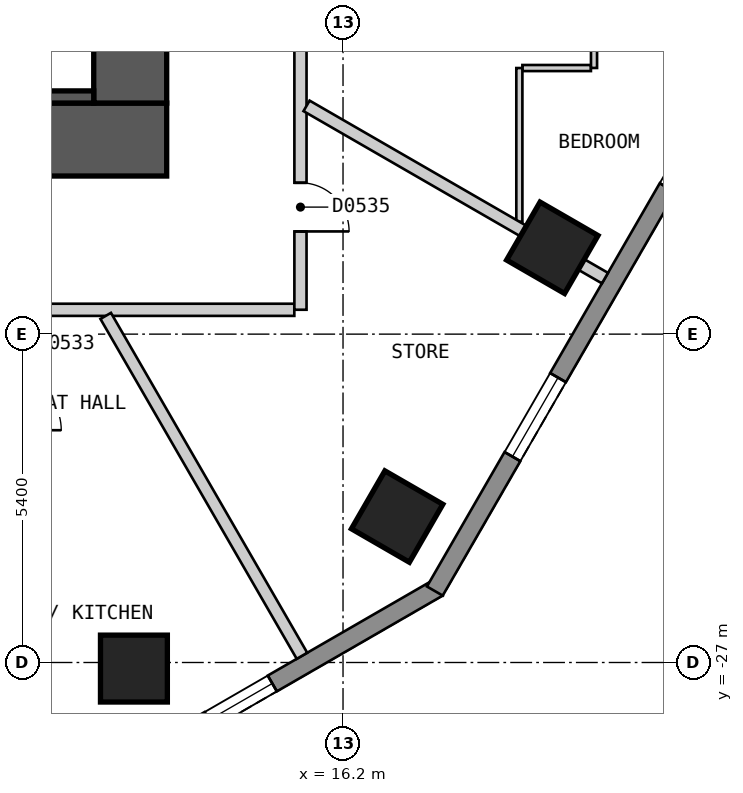
"""IFC4 building model, lengths in metres.
Left out: names, types, materials, properties, quantities, classifications, styles, units other than length and angle.
Written with IfcOpenShell. Run it as: python <this file> out.ifc"""

import sys

from ifc_helpers import new_model, si_unit, direction, frame, frame_2d, origin, origin_2d, place, context, subcontext, project, spatial, polyline, rectangle, outline, extrude, element, fill, save


model = new_model("IFC4")
c1 = context("Model", 3, precision=1e-05, world=origin(), true_north=direction((0.0, 1.0)))
c2 = subcontext(c1, "Body", "Model", "MODEL_VIEW")
j1 = project(units=[si_unit("LENGTHUNIT", "METRE"), si_unit("PLANEANGLEUNIT", "RADIAN")], contexts=[c1])
p1 = place(None, origin())
s1 = spatial("IfcSite", under=j1, at=p1, CompositionType="ELEMENT")
p2 = place(p1, origin())
s2 = spatial("IfcBuilding", under=s1, at=p2, CompositionType="ELEMENT")
p3 = place(p2, frame((0.0, 0.0, 50.4)))
s3 = spatial("IfcBuildingStorey", under=s2, at=p3, CompositionType="ELEMENT", Elevation=50.4)
for number, where, z_axis, x_axis in (
    (1, (12.761, -27.1, 0.0), (0.0, 0.0, 1.0), (1.0, 0.0, 0.0)),
    (2, (17.09, -24.6, 0.0), (0.0, 0.0, 1.0), (0.5, 0.866, 0.0)),
    (3, (19.642, -20.18, 0.0), (0.0, 0.0, 1.0), (0.5, 0.866, 0.0)),
):
    element("IfcColumn", number, at=place(p3, frame(where, z_axis=z_axis, x_axis=x_axis)), inside=s3, PredefinedType="COLUMN", context=c2, shape_type="SweptSolid", body=[
        extrude(rectangle(XDim=1.1, YDim=1.1, at=origin_2d()), origin(), (0.0, 0.0, 1.0), 3.0),
    ])
p4 = place(p3, frame((-13.3, -18.4, 0.0), z_axis=(0.0, 0.0, 1.0), x_axis=(1.0, 0.0, 0.0)))
e4 = element("IfcWall", 4, at=p4, inside=s3, PredefinedType="SHEAR", context=c2, shape_type="SweptSolid", body=[
    extrude(rectangle(XDim=26.6, YDim=1.2, at=frame_2d((13.3, 0.0))), origin(), (0.0, 0.0, 1.0), 2.7),
])
p5 = place(p3, frame((12.7, -17.8, 0.0), z_axis=(0.0, 0.0, 1.0), x_axis=(0.0, 1.0, 0.0)))
e5 = element("IfcWall", 5, at=p5, inside=s3, PredefinedType="SHEAR", context=c2, shape_type="SweptSolid", body=[
    extrude(rectangle(XDim=11.6, YDim=1.2, at=frame_2d((5.8, 0.0))), origin(), (0.0, 0.0, 1.0), 2.7),
])
p6 = place(p3, frame((13.435, -28.27, 0.0), z_axis=(0.0, 0.0, 1.0), x_axis=(0.866010750942, 0.50002537861, 0.0)))
e6 = element("IfcWall", 6, at=p6, inside=s3, PredefinedType="SOLIDWALL", context=c2, shape_type="SweptSolid", body=[
    extrude(outline(polyline([(0.0, -0.15), (5.0, -0.15), (4.919, 0.15), (0.08, 0.15), (0.0, -0.15)])), origin(), (0.0, 0.0, 1.0), 2.7),
])
p7 = place(p6, frame((0.65, 0.0, 0.15)))
e7 = element("IfcOpeningElement", 7, at=p7, cuts=e6, PredefinedType="OPENING", context=c2, shape_type="SweptSolid", body=[
    extrude(rectangle(XDim=1.2, YDim=2.1, at=frame_2d((0.6, 1.05))), frame((0.0, 0.16, 0.0), z_axis=(0.0, -1.0, 0.0), x_axis=(1.0, 0.0, 0.0)), (0.0, 0.0, 1.0), 0.32),
])
p8 = place(p3, frame((17.71, -25.825, 0.0), z_axis=(0.0, 0.0, 1.0), x_axis=(0.500001938803, 0.866024284413, 0.0)))
e8 = element("IfcWall", 8, at=p8, inside=s3, PredefinedType="SOLIDWALL", context=c2, shape_type="SweptSolid", body=[
    extrude(outline(polyline([(0.0, -0.15), (27.02, -0.15), (26.94, 0.15), (0.08, 0.15), (0.0, -0.15)])), origin(), (0.0, 0.0, 1.0), 2.7),
])
p9 = place(p8, frame((2.553, 0.0, 0.15)))
e9 = element("IfcOpeningElement", 9, at=p9, cuts=e8, PredefinedType="OPENING", context=c2, shape_type="SweptSolid", body=[
    extrude(rectangle(XDim=1.5, YDim=2.1, at=frame_2d((0.75, 1.05))), frame((0.0, 0.16, 0.0), z_axis=(0.0, -1.0, 0.0), x_axis=(1.0, 0.0, 0.0)), (0.0, 0.0, 1.0), 0.32),
])
p10 = place(p8, frame((7.658, 0.0, 0.15)))
e10 = element("IfcOpeningElement", 10, at=p10, cuts=e8, PredefinedType="OPENING", context=c2, shape_type="SweptSolid", body=[
    extrude(rectangle(XDim=1.5, YDim=2.1, at=frame_2d((0.75, 1.05))), frame((0.0, 0.16, 0.0), z_axis=(0.0, -1.0, 0.0), x_axis=(1.0, 0.0, 0.0)), (0.0, 0.0, 1.0), 0.32),
])
p11 = place(p8, frame((12.761, 0.0, 0.15)))
e11 = element("IfcOpeningElement", 11, at=p11, cuts=e8, PredefinedType="OPENING", context=c2, shape_type="SweptSolid", body=[
    extrude(rectangle(XDim=1.5, YDim=2.1, at=frame_2d((0.75, 1.05))), frame((0.0, 0.16, 0.0), z_axis=(0.0, -1.0, 0.0), x_axis=(1.0, 0.0, 0.0)), (0.0, 0.0, 1.0), 0.32),
])
p12 = place(p8, frame((17.865, 0.0, 0.15)))
e12 = element("IfcOpeningElement", 12, at=p12, cuts=e8, PredefinedType="OPENING", context=c2, shape_type="SweptSolid", body=[
    extrude(rectangle(XDim=1.5, YDim=2.1, at=frame_2d((0.75, 1.05))), frame((0.0, 0.16, 0.0), z_axis=(0.0, -1.0, 0.0), x_axis=(1.0, 0.0, 0.0)), (0.0, 0.0, 1.0), 0.32),
])
p13 = place(p8, frame((22.969, 0.0, 0.15)))
e13 = element("IfcOpeningElement", 13, at=p13, cuts=e8, PredefinedType="OPENING", context=c2, shape_type="SweptSolid", body=[
    extrude(rectangle(XDim=1.5, YDim=2.1, at=frame_2d((0.75, 1.05))), frame((0.0, 0.16, 0.0), z_axis=(0.0, -1.0, 0.0), x_axis=(1.0, 0.0, 0.0)), (0.0, 0.0, 1.0), 0.32),
])
p14 = place(p3, frame((-15.4, -21.2, 0.0), z_axis=(0.0, 0.0, 1.0), x_axis=(1.0, 0.0, 0.0)))
e14 = element("IfcWall", 14, at=p14, inside=s3, PredefinedType="PARTITIONING", context=c2, shape_type="SweptSolid", body=[
    extrude(rectangle(XDim=30.799, YDim=0.2, at=frame_2d((15.399, 0.0))), origin(), (0.0, 0.0, 1.0), 2.7),
])
p15 = place(p14, frame((4.985, 0.0, 0.0)))
e15 = element("IfcOpeningElement", 15, at=p15, cuts=e14, PredefinedType="OPENING", context=c2, shape_type="SweptSolid", body=[
    extrude(rectangle(XDim=0.9, YDim=2.1, at=frame_2d((0.45, 1.05))), frame((0.0, 0.11, 0.0), z_axis=(0.0, -1.0, 0.0), x_axis=(1.0, 0.0, 0.0)), (0.0, 0.0, 1.0), 0.22),
])
p16 = place(p14, frame((20.005, 0.0, 0.0)))
e16 = element("IfcOpeningElement", 16, at=p16, cuts=e14, PredefinedType="OPENING", context=c2, shape_type="SweptSolid", body=[
    extrude(rectangle(XDim=1.0, YDim=2.1, at=frame_2d((0.5, 1.05))), frame((0.0, 0.11, 0.0), z_axis=(0.0, -1.0, 0.0), x_axis=(1.0, 0.0, 0.0)), (0.0, 0.0, 1.0), 0.22),
])
p17 = place(p14, frame((24.916, 0.0, 0.0)))
e17 = element("IfcOpeningElement", 17, at=p17, cuts=e14, PredefinedType="OPENING", context=c2, shape_type="SweptSolid", body=[
    extrude(rectangle(XDim=0.9, YDim=2.1, at=frame_2d((0.45, 1.05))), frame((0.0, 0.11, 0.0), z_axis=(0.0, -1.0, 0.0), x_axis=(1.0, 0.0, 0.0)), (0.0, 0.0, 1.0), 0.22),
])
p18 = place(p3, frame((15.5, -21.199, 0.0), z_axis=(0.0, 0.0, 1.0), x_axis=(0.0, 1.0, 0.0)))
e18 = element("IfcWall", 18, at=p18, inside=s3, PredefinedType="PARTITIONING", context=c2, shape_type="SweptSolid", body=[
    extrude(rectangle(XDim=7.575, YDim=0.2, at=frame_2d((3.788, 0.0))), origin(), (0.0, 0.0, 1.0), 2.7),
])
p19 = place(p18, frame((1.288, 0.0, 0.0)))
e19 = element("IfcOpeningElement", 19, at=p19, cuts=e18, PredefinedType="OPENING", context=c2, shape_type="SweptSolid", body=[
    extrude(rectangle(XDim=0.8, YDim=2.1, at=frame_2d((0.4, 1.05))), frame((0.0, 0.11, 0.0), z_axis=(0.0, -1.0, 0.0), x_axis=(1.0, 0.0, 0.0)), (0.0, 0.0, 1.0), 0.22),
])
p20 = place(p3, frame((19.15, -17.224, 0.0), z_axis=(0.0, 0.0, 1.0), x_axis=(1.0, 0.0, 0.0)))
e20 = element("IfcWall", 20, at=p20, inside=s3, PredefinedType="PARTITIONING", context=c2, shape_type="SweptSolid", body=[
    extrude(rectangle(XDim=1.127, YDim=0.1, at=frame_2d((0.563, 0.0))), origin(), (0.0, 0.0, 1.0), 2.7),
])
p21 = place(p3, frame((19.1, -19.751, 0.0), z_axis=(0.0, 0.0, 1.0), x_axis=(0.0, 1.0, 0.0)))
e21 = element("IfcWall", 21, at=p21, inside=s3, PredefinedType="PARTITIONING", context=c2, shape_type="SweptSolid", body=[
    extrude(rectangle(XDim=2.527, YDim=0.1, at=frame_2d((1.263, 0.0))), origin(), (0.0, 0.0, 1.0), 2.7),
])
p22 = place(p3, frame((20.328, -17.223, 0.0), z_axis=(0.0, 0.0, 1.0), x_axis=(0.0, 1.0, 0.0)))
e22 = element("IfcWall", 22, at=p22, inside=s3, PredefinedType="PARTITIONING", context=c2, shape_type="SweptSolid", body=[
    extrude(rectangle(XDim=8.376, YDim=0.1, at=frame_2d((4.188, 0.0))), origin(), (0.0, 0.0, 1.0), 2.7),
])
p23 = place(p22, frame((0.37, 0.0, 0.0)))
e23 = element("IfcOpeningElement", 23, at=p23, cuts=e22, PredefinedType="OPENING", context=c2, shape_type="SweptSolid", body=[
    extrude(rectangle(XDim=0.8, YDim=2.1, at=frame_2d((0.4, 1.05))), frame((0.0, 0.06, 0.0), z_axis=(0.0, -1.0, 0.0), x_axis=(1.0, 0.0, 0.0)), (0.0, 0.0, 1.0), 0.12),
])
p24 = place(p3, frame((12.297, -21.3, 0.0), z_axis=(0.0, 0.0, 1.0), x_axis=(0.500056399578, -0.865992839024, 0.0)))
e24 = element("IfcWall", 24, at=p24, inside=s3, PredefinedType="PARTITIONING", context=c2, shape_type="SweptSolid", body=[
    extrude(rectangle(XDim=6.455, YDim=0.2, at=frame_2d((3.228, 0.0))), origin(), (0.0, 0.0, 1.0), 2.7),
])
p25 = place(p3, frame((15.6, -17.846, 0.0), z_axis=(0.0, 0.0, 1.0), x_axis=(0.866071523686, -0.499920109479, 0.0)))
e25 = element("IfcWall", 25, at=p25, inside=s3, PredefinedType="PARTITIONING", context=c2, shape_type="SweptSolid", body=[
    extrude(rectangle(XDim=5.667, YDim=0.2, at=frame_2d((2.833, 0.0))), origin(), (0.0, 0.0, 1.0), 2.7),
])
p26 = place(p3, frame((6.7, -17.7, 0.0), z_axis=(0.0, 0.0, 1.0), x_axis=(1.0, 0.0, 0.0)))
e26 = element("IfcWall", 26, at=p26, inside=s3, PredefinedType="SOLIDWALL", context=c2, shape_type="SweptSolid", body=[
    extrude(rectangle(XDim=5.4, YDim=0.2, at=frame_2d((2.7, 0.0))), origin(), (0.0, 0.0, 1.0), 2.7),
])
p27 = place(p7, origin())
e27 = element("IfcWindow", 27, at=p27, inside=s3, PartitioningType="SINGLE_PANEL", PredefinedType="WINDOW", context=c2, shape_type="SweptSolid", body=[
    extrude(rectangle(XDim=1.2, YDim=2.1, at=frame_2d((0.6, 1.05))), frame((0.0, 0.03, 0.0), z_axis=(0.0, -1.0, 0.0), x_axis=(1.0, 0.0, 0.0)), (0.0, 0.0, 1.0), 0.06),
])
fill(e7, e27)
p28 = place(p9, origin())
e28 = element("IfcWindow", 28, at=p28, inside=s3, PartitioningType="SINGLE_PANEL", PredefinedType="WINDOW", context=c2, shape_type="SweptSolid", body=[
    extrude(rectangle(XDim=1.5, YDim=2.1, at=frame_2d((0.75, 1.05))), frame((0.0, 0.03, 0.0), z_axis=(0.0, -1.0, 0.0), x_axis=(1.0, 0.0, 0.0)), (0.0, 0.0, 1.0), 0.06),
])
fill(e9, e28)
p29 = place(p19, origin())
e29 = element("IfcDoor", 29, at=p29, inside=s3, OperationType="SINGLE_SWING_LEFT", PredefinedType="DOOR", context=c2, shape_type="SweptSolid", body=[
    extrude(rectangle(XDim=0.8, YDim=2.1, at=frame_2d((0.4, 1.05))), frame((0.0, 0.025, 0.0), z_axis=(0.0, -1.0, 0.0), x_axis=(1.0, 0.0, 0.0)), (0.0, 0.0, 1.0), 0.05),
])
fill(e19, e29)
save(model, sys.argv[1])
